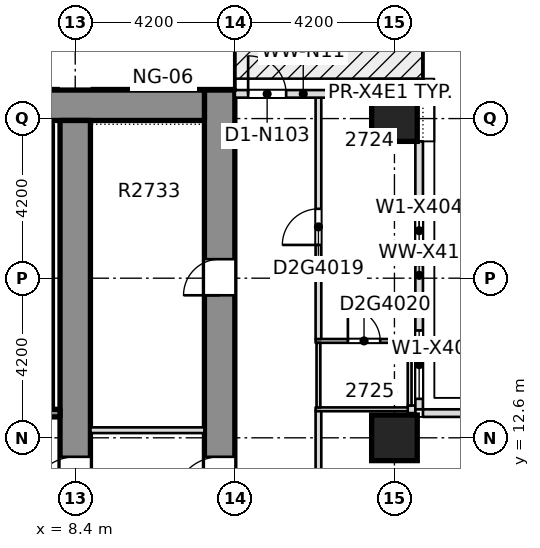
"""IFC4 building model, lengths in metres.
Left out: names, types, materials, properties, quantities, classifications, styles, units other than length and angle.
Written with IfcOpenShell. Run it as: python <this file> out.ifc"""

import sys

from ifc_helpers import new_model, si_unit, direction, frame, frame_2d, origin, origin_2d, place, context, subcontext, project, spatial, rectangle, extrude, element, fill, save


model = new_model("IFC4")
c1 = context("Model", 3, precision=1e-05, world=origin(), true_north=direction((0.0, 1.0)))
c2 = subcontext(c1, "Body", "Model", "MODEL_VIEW")
j1 = project(units=[si_unit("LENGTHUNIT", "METRE"), si_unit("PLANEANGLEUNIT", "RADIAN")], contexts=[c1])
p1 = place(None, origin())
s1 = spatial("IfcSite", under=j1, at=p1, CompositionType="ELEMENT")
p2 = place(p1, origin())
s2 = spatial("IfcBuilding", under=s1, at=p2, CompositionType="ELEMENT")
p3 = place(p2, frame((0.0, 0.0, 108.0)))
s3 = spatial("IfcBuildingStorey", under=s2, at=p3, CompositionType="ELEMENT", Elevation=108.0)
p4 = place(p3, frame((12.2, -8.4, -0.32), z_axis=(0.0, 0.0, 1.0), x_axis=(0.0, 1.0, 0.0)))
e1 = element("IfcWall", 1, at=p4, inside=s3, PredefinedType="SHEAR", context=c2, shape_type="SweptSolid", body=[
    extrude(rectangle(XDim=30.15, YDim=0.8, at=frame_2d((15.075, 0.0))), origin(), (0.0, 0.0, 1.0), 3.45),
])
p5 = place(p4, frame((2.875, 0.0, 0.32)))
e2 = element("IfcOpeningElement", 2, at=p5, cuts=e1, PredefinedType="OPENING", context=c2, shape_type="SweptSolid", body=[
    extrude(rectangle(XDim=0.95, YDim=2.1, at=frame_2d((0.475, 1.05))), frame((0.0, 0.41, 0.0), z_axis=(0.0, -1.0, 0.0), x_axis=(1.0, 0.0, 0.0)), (0.0, 0.0, 1.0), 0.82),
])
p6 = place(p4, frame((6.575, 0.0, 0.32)))
e3 = element("IfcOpeningElement", 3, at=p6, cuts=e1, PredefinedType="OPENING", context=c2, shape_type="SweptSolid", body=[
    extrude(rectangle(XDim=0.95, YDim=2.1, at=frame_2d((0.475, 1.05))), frame((0.0, 0.41, 0.0), z_axis=(0.0, -1.0, 0.0), x_axis=(1.0, 0.0, 0.0)), (0.0, 0.0, 1.0), 0.82),
])
p7 = place(p4, frame((9.425, 0.0, 0.32)))
e4 = element("IfcOpeningElement", 4, at=p7, cuts=e1, PredefinedType="OPENING", context=c2, shape_type="SweptSolid", body=[
    extrude(rectangle(XDim=0.95, YDim=2.1, at=frame_2d((0.475, 1.05))), frame((0.0, 0.41, 0.0), z_axis=(0.0, -1.0, 0.0), x_axis=(1.0, 0.0, 0.0)), (0.0, 0.0, 1.0), 0.82),
])
p8 = place(p4, frame((13.225, 0.0, 0.32)))
e5 = element("IfcOpeningElement", 5, at=p8, cuts=e1, PredefinedType="OPENING", context=c2, shape_type="SweptSolid", body=[
    extrude(rectangle(XDim=0.95, YDim=2.1, at=frame_2d((0.475, 1.05))), frame((0.0, 0.41, 0.0), z_axis=(0.0, -1.0, 0.0), x_axis=(1.0, 0.0, 0.0)), (0.0, 0.0, 1.0), 0.82),
])
p9 = place(p4, frame((16.775, 0.0, 0.32)))
e6 = element("IfcOpeningElement", 6, at=p9, cuts=e1, PredefinedType="OPENING", context=c2, shape_type="SweptSolid", body=[
    extrude(rectangle(XDim=0.95, YDim=2.1, at=frame_2d((0.475, 1.05))), frame((0.0, 0.41, 0.0), z_axis=(0.0, -1.0, 0.0), x_axis=(1.0, 0.0, 0.0)), (0.0, 0.0, 1.0), 0.82),
])
p10 = place(p4, frame((24.75, 0.0, 0.32)))
e7 = element("IfcOpeningElement", 7, at=p10, cuts=e1, PredefinedType="OPENING", context=c2, shape_type="SweptSolid", body=[
    extrude(rectangle(XDim=0.95, YDim=2.1, at=frame_2d((0.475, 1.05))), frame((0.0, 0.41, 0.0), z_axis=(0.0, -1.0, 0.0), x_axis=(1.0, 0.0, 0.0)), (0.0, 0.0, 1.0), 0.82),
])
p11 = place(p4, frame((19.3, 0.0, 0.32)))
e8 = element("IfcOpeningElement", 8, at=p11, cuts=e1, PredefinedType="OPENING", context=c2, shape_type="SweptSolid", body=[
    extrude(rectangle(XDim=1.2, YDim=2.1, at=frame_2d((0.6, 1.05))), frame((0.0, 0.41, 0.0), z_axis=(0.0, -1.0, 0.0), x_axis=(1.0, 0.0, 0.0)), (0.0, 0.0, 1.0), 0.82),
])
p12 = place(p3, frame((-11.8, 21.35, -0.32), z_axis=(0.0, 0.0, 1.0), x_axis=(1.0, 0.0, 0.0)))
e9 = element("IfcWall", 9, at=p12, inside=s3, PredefinedType="SHEAR", context=c2, shape_type="SweptSolid", body=[
    extrude(rectangle(XDim=23.6, YDim=0.8, at=frame_2d((11.8, 0.0))), origin(), (0.0, 0.0, 1.0), 3.45),
])
p13 = place(p3, frame((8.4, -7.6, -0.32), z_axis=(0.0, 0.0, 1.0), x_axis=(0.0, 1.0, 0.0)))
e10 = element("IfcWall", 10, at=p13, inside=s3, PredefinedType="SHEAR", context=c2, shape_type="SweptSolid", body=[
    extrude(rectangle(XDim=28.55, YDim=0.8, at=frame_2d((14.275, 0.0))), origin(), (0.0, 0.0, 1.0), 3.45),
])
p14 = place(p13, frame((18.5, 0.0, 0.32)))
e11 = element("IfcOpeningElement", 11, at=p14, cuts=e10, PredefinedType="OPENING", context=c2, shape_type="SweptSolid", body=[
    extrude(rectangle(XDim=1.2, YDim=2.1, at=frame_2d((0.6, 1.05))), frame((0.0, 0.41, 0.0), z_axis=(0.0, -1.0, 0.0), x_axis=(1.0, 0.0, 0.0)), (0.0, 0.0, 1.0), 0.82),
])
for number, where, z_axis, x_axis in (
    (12, (16.8, 12.6, -0.32), (0.0, 0.0, 1.0), (1.0, 0.0, 0.0)),
    (13, (16.8, 21.0, -0.32), (0.0, 0.0, 1.0), (1.0, 0.0, 0.0)),
):
    element("IfcColumn", number, at=place(p3, frame(where, z_axis=z_axis, x_axis=x_axis)), inside=s3, PredefinedType="COLUMN", context=c2, shape_type="SweptSolid", body=[
        extrude(rectangle(XDim=1.2, YDim=1.2, at=origin_2d()), origin(), (0.0, 0.0, 1.0), 3.45),
    ])
p15 = place(p3, frame((14.725, 13.35, 0.0), z_axis=(0.0, 0.0, 1.0), x_axis=(1.0, 0.0, 0.0)))
e14 = element("IfcWall", 14, at=p15, inside=s3, PredefinedType="PARTITIONING", context=c2, shape_type="SweptSolid", body=[
    extrude(rectangle(XDim=2.525, YDim=0.1, at=frame_2d((1.262, 0.0))), origin(), (0.0, 0.0, 1.0), 3.13),
])
p16 = place(p3, frame((17.15, 13.35, 0.0), z_axis=(0.0, 0.0, 1.0), x_axis=(1.0, 0.0, 0.0)))
e15 = element("IfcWall", 15, at=p16, inside=s3, PredefinedType="PARTITIONING", context=c2, shape_type="SweptSolid", body=[
    extrude(rectangle(XDim=0.2, YDim=0.2, at=frame_2d((0.1, 0.0))), origin(), (0.0, 0.0, 1.0), 3.13),
])
p17 = place(p3, frame((14.725, 15.15, 0.0), z_axis=(0.0, 0.0, 1.0), x_axis=(1.0, 0.0, 0.0)))
e16 = element("IfcWall", 16, at=p17, inside=s3, PredefinedType="PARTITIONING", context=c2, shape_type="SweptSolid", body=[
    extrude(rectangle(XDim=2.525, YDim=0.1, at=frame_2d((1.262, 0.0))), origin(), (0.0, 0.0, 1.0), 3.13),
])
p18 = place(p17, frame((0.85, 0.0, 0.0)))
e17 = element("IfcOpeningElement", 17, at=p18, cuts=e16, PredefinedType="OPENING", context=c2, shape_type="SweptSolid", body=[
    extrude(rectangle(XDim=0.85, YDim=2.1, at=frame_2d((0.425, 1.05))), frame((0.0, 0.06, 0.0), z_axis=(0.0, -1.0, 0.0), x_axis=(1.0, 0.0, 0.0)), (0.0, 0.0, 1.0), 0.12),
])
p19 = place(p3, frame((14.8, -5.223, 0.0), z_axis=(0.0, 0.0, 1.0), x_axis=(0.0, 1.0, 0.0)))
e18 = element("IfcWall", 18, at=p19, inside=s3, PredefinedType="PARTITIONING", context=c2, shape_type="SweptSolid", body=[
    extrude(rectangle(XDim=18.523, YDim=0.15, at=frame_2d((9.261, 0.0))), origin(), (0.0, 0.0, 1.0), 3.13),
])
p20 = place(p19, frame((13.098, 0.0, 0.0)))
e19 = element("IfcOpeningElement", 19, at=p20, cuts=e18, PredefinedType="OPENING", context=c2, shape_type="SweptSolid", body=[
    extrude(rectangle(XDim=1.0, YDim=2.1, at=frame_2d((0.5, 1.05))), frame((0.0, 0.085, 0.0), z_axis=(0.0, -1.0, 0.0), x_axis=(1.0, 0.0, 0.0)), (0.0, 0.0, 1.0), 0.17),
])
p21 = place(p19, frame((4.673, 0.0, 0.0)))
e20 = element("IfcOpeningElement", 20, at=p21, cuts=e18, PredefinedType="OPENING", context=c2, shape_type="SweptSolid", body=[
    extrude(rectangle(XDim=1.1, YDim=2.1, at=frame_2d((0.55, 1.05))), frame((0.0, 0.085, 0.0), z_axis=(0.0, -1.0, 0.0), x_axis=(1.0, 0.0, 0.0)), (0.0, 0.0, 1.0), 0.17),
])
p22 = place(p3, frame((14.8, 13.4, 0.0), z_axis=(0.0, 0.0, 1.0), x_axis=(0.0, 1.0, 0.0)))
e21 = element("IfcWall", 21, at=p22, inside=s3, PredefinedType="PARTITIONING", context=c2, shape_type="SweptSolid", body=[
    extrude(rectangle(XDim=1.7, YDim=0.1, at=frame_2d((0.85, 0.0))), origin(), (0.0, 0.0, 1.0), 3.13),
])
p23 = place(p3, frame((14.8, 15.2, 0.0), z_axis=(0.0, 0.0, 1.0), x_axis=(0.0, 1.0, 0.0)))
e22 = element("IfcWall", 22, at=p23, inside=s3, PredefinedType="PARTITIONING", context=c2, shape_type="SweptSolid", body=[
    extrude(rectangle(XDim=6.35, YDim=0.15, at=frame_2d((3.175, 0.0))), origin(), (0.0, 0.0, 1.0), 3.13),
])
p24 = place(p23, frame((2.475, 0.0, 0.0)))
e23 = element("IfcOpeningElement", 23, at=p24, cuts=e22, PredefinedType="OPENING", context=c2, shape_type="SweptSolid", body=[
    extrude(rectangle(XDim=0.95, YDim=2.1, at=frame_2d((0.475, 1.05))), frame((0.0, 0.085, 0.0), z_axis=(0.0, -1.0, 0.0), x_axis=(1.0, 0.0, 0.0)), (0.0, 0.0, 1.0), 0.17),
])
p25 = place(p3, frame((17.2, 13.45, 0.0), z_axis=(0.0, 0.0, 1.0), x_axis=(0.0, 1.0, 0.0)))
e24 = element("IfcWall", 24, at=p25, inside=s3, PredefinedType="PARTITIONING", context=c2, shape_type="SweptSolid", body=[
    extrude(rectangle(XDim=1.65, YDim=0.1, at=frame_2d((0.825, 0.0))), origin(), (0.0, 0.0, 1.0), 3.13),
])
p26 = place(p3, frame((24.6, 13.25, 0.0), z_axis=(0.0, 0.0, 1.0), x_axis=(-1.0, 0.0, 0.0)))
e25 = element("IfcWall", 25, at=p26, inside=s3, PredefinedType="STANDARD", context=c2, shape_type="SweptSolid", body=[
    extrude(rectangle(XDim=7.05, YDim=0.2, at=frame_2d((3.525, 0.0))), origin(), (0.0, 0.0, 1.0), 3.13),
])
p27 = place(p3, frame((17.45, 13.35, 0.0), z_axis=(0.0, 0.0, 1.0), x_axis=(0.0, 1.0, 0.0)))
e26 = element("IfcWall", 26, at=p27, inside=s3, PredefinedType="STANDARD", context=c2, shape_type="SweptSolid", body=[
    extrude(rectangle(XDim=7.05, YDim=0.2, at=frame_2d((3.525, 0.0))), origin(), (0.0, 0.0, 1.0), 3.13),
])
p28 = place(p27, frame((0.275, 0.0, 0.2)))
e27 = element("IfcOpeningElement", 27, at=p28, cuts=e26, PredefinedType="OPENING", context=c2, shape_type="SweptSolid", body=[
    extrude(rectangle(XDim=1.8, YDim=2.65, at=frame_2d((0.9, 1.325))), frame((0.0, 0.11, 0.0), z_axis=(0.0, -1.0, 0.0), x_axis=(1.0, 0.0, 0.0)), (0.0, 0.0, 1.0), 0.22),
])
p29 = place(p27, frame((3.8, 0.0, 0.2)))
e28 = element("IfcOpeningElement", 28, at=p29, cuts=e26, PredefinedType="OPENING", context=c2, shape_type="SweptSolid", body=[
    extrude(rectangle(XDim=1.8, YDim=2.65, at=frame_2d((0.9, 1.325))), frame((0.0, 0.11, 0.0), z_axis=(0.0, -1.0, 0.0), x_axis=(1.0, 0.0, 0.0)), (0.0, 0.0, 1.0), 0.22),
])
p30 = place(p3, frame((16.2, 21.65, 0.0), z_axis=(0.0, 0.0, 1.0), x_axis=(-1.0, 0.0, 0.0)))
e29 = element("IfcWall", 29, at=p30, inside=s3, PredefinedType="STANDARD", context=c2, shape_type="SweptSolid", body=[
    extrude(rectangle(XDim=3.6, YDim=0.2, at=frame_2d((1.8, 0.0))), origin(), (0.0, 0.0, 1.0), 3.13),
])
p31 = place(p30, frame((2.25, 0.0, 0.0)))
e30 = element("IfcOpeningElement", 30, at=p31, cuts=e29, PredefinedType="OPENING", context=c2, shape_type="SweptSolid", body=[
    extrude(rectangle(XDim=1.0, YDim=2.4, at=frame_2d((0.5, 1.2))), frame((0.0, 0.11, 0.0), z_axis=(0.0, -1.0, 0.0), x_axis=(1.0, 0.0, 0.0)), (0.0, 0.0, 1.0), 0.22),
])
p32 = place(p3, frame((3.425, 13.25, 0.0), z_axis=(0.0, 0.0, 1.0), x_axis=(1.0, 0.0, 0.0)))
e31 = element("IfcWall", 31, at=p32, inside=s3, PredefinedType="SOLIDWALL", context=c2, shape_type="SweptSolid", body=[
    extrude(rectangle(XDim=4.574, YDim=0.2, at=frame_2d((2.287, 0.0))), origin(), (0.0, 0.0, 1.0), 3.13),
])
p33 = place(p32, frame((1.825, 0.0, 0.0)))
e32 = element("IfcOpeningElement", 32, at=p33, cuts=e31, PredefinedType="OPENING", context=c2, shape_type="SweptSolid", body=[
    extrude(rectangle(XDim=1.2, YDim=2.1, at=frame_2d((0.6, 1.05))), frame((0.0, 0.11, 0.0), z_axis=(0.0, -1.0, 0.0), x_axis=(1.0, 0.0, 0.0)), (0.0, 0.0, 1.0), 0.22),
])
p34 = place(p3, frame((8.801, 12.8, 0.0), z_axis=(0.0, 0.0, 1.0), x_axis=(1.0, 0.0, 0.0)))
e33 = element("IfcWall", 33, at=p34, inside=s3, PredefinedType="PARTITIONING", context=c2, shape_type="SweptSolid", body=[
    extrude(rectangle(XDim=2.998, YDim=0.15, at=frame_2d((1.499, 0.0))), origin(), (0.0, 0.0, 1.0), 3.13),
])
p35 = place(p24, origin())
e34 = element("IfcDoor", 34, at=p35, inside=s3, OperationType="SINGLE_SWING_LEFT", PredefinedType="DOOR", context=c2, shape_type="SweptSolid", body=[
    extrude(rectangle(XDim=0.95, YDim=2.1, at=frame_2d((0.475, 1.05))), frame((0.0, 0.025, 0.0), z_axis=(0.0, -1.0, 0.0), x_axis=(1.0, 0.0, 0.0)), (0.0, 0.0, 1.0), 0.05),
])
fill(e23, e34)
p36 = place(p18, origin())
e35 = element("IfcDoor", 35, at=p36, inside=s3, OperationType="SINGLE_SWING_RIGHT", PredefinedType="DOOR", context=c2, shape_type="SweptSolid", body=[
    extrude(rectangle(XDim=0.85, YDim=2.1, at=frame_2d((0.425, 1.05))), frame((0.0, 0.025, 0.0), z_axis=(0.0, -1.0, 0.0), x_axis=(1.0, 0.0, 0.0)), (0.0, 0.0, 1.0), 0.05),
])
fill(e17, e35)
p37 = place(p28, origin())
e36 = element("IfcWindow", 36, at=p37, inside=s3, PartitioningType="SINGLE_PANEL", PredefinedType="WINDOW", context=c2, shape_type="SweptSolid", body=[
    extrude(rectangle(XDim=1.8, YDim=2.65, at=frame_2d((0.9, 1.325))), frame((0.0, 0.03, 0.0), z_axis=(0.0, -1.0, 0.0), x_axis=(1.0, 0.0, 0.0)), (0.0, 0.0, 1.0), 0.06),
])
fill(e27, e36)
p38 = place(p29, origin())
e37 = element("IfcWindow", 37, at=p38, inside=s3, PartitioningType="SINGLE_PANEL", PredefinedType="WINDOW", context=c2, shape_type="SweptSolid", body=[
    extrude(rectangle(XDim=1.8, YDim=2.65, at=frame_2d((0.9, 1.325))), frame((0.0, 0.03, 0.0), z_axis=(0.0, -1.0, 0.0), x_axis=(1.0, 0.0, 0.0)), (0.0, 0.0, 1.0), 0.06),
])
fill(e28, e37)
p39 = place(p31, origin())
e38 = element("IfcDoor", 38, at=p39, inside=s3, OperationType="SINGLE_SWING_LEFT", PredefinedType="DOOR", context=c2, shape_type="SweptSolid", body=[
    extrude(rectangle(XDim=1.0, YDim=2.4, at=frame_2d((0.5, 1.2))), frame((0.0, 0.025, 0.0), z_axis=(0.0, -1.0, 0.0), x_axis=(1.0, 0.0, 0.0)), (0.0, 0.0, 1.0), 0.05),
])
fill(e30, e38)
p40 = place(p10, origin())
e39 = element("IfcDoor", 39, at=p40, inside=s3, OperationType="SINGLE_SWING_LEFT", PredefinedType="DOOR", context=c2, shape_type="SweptSolid", body=[
    extrude(rectangle(XDim=0.95, YDim=2.1, at=frame_2d((0.475, 1.05))), frame((0.0, 0.025, 0.0), z_axis=(0.0, -1.0, 0.0), x_axis=(1.0, 0.0, 0.0)), (0.0, 0.0, 1.0), 0.05),
])
fill(e7, e39)
p41 = place(p11, origin())
e40 = element("IfcDoor", 40, at=p41, inside=s3, OperationType="SINGLE_SWING_LEFT", PredefinedType="DOOR", context=c2, shape_type="SweptSolid", body=[
    extrude(rectangle(XDim=1.2, YDim=2.1, at=frame_2d((0.6, 1.05))), frame((0.0, 0.025, 0.0), z_axis=(0.0, -1.0, 0.0), x_axis=(1.0, 0.0, 0.0)), (0.0, 0.0, 1.0), 0.05),
])
fill(e8, e40)
p42 = place(p14, origin())
e41 = element("IfcDoor", 41, at=p42, inside=s3, OperationType="SINGLE_SWING_LEFT", PredefinedType="DOOR", context=c2, shape_type="SweptSolid", body=[
    extrude(rectangle(XDim=1.2, YDim=2.1, at=frame_2d((0.6, 1.05))), frame((0.0, 0.025, 0.0), z_axis=(0.0, -1.0, 0.0), x_axis=(1.0, 0.0, 0.0)), (0.0, 0.0, 1.0), 0.05),
])
fill(e11, e41)
save(model, sys.argv[1])
